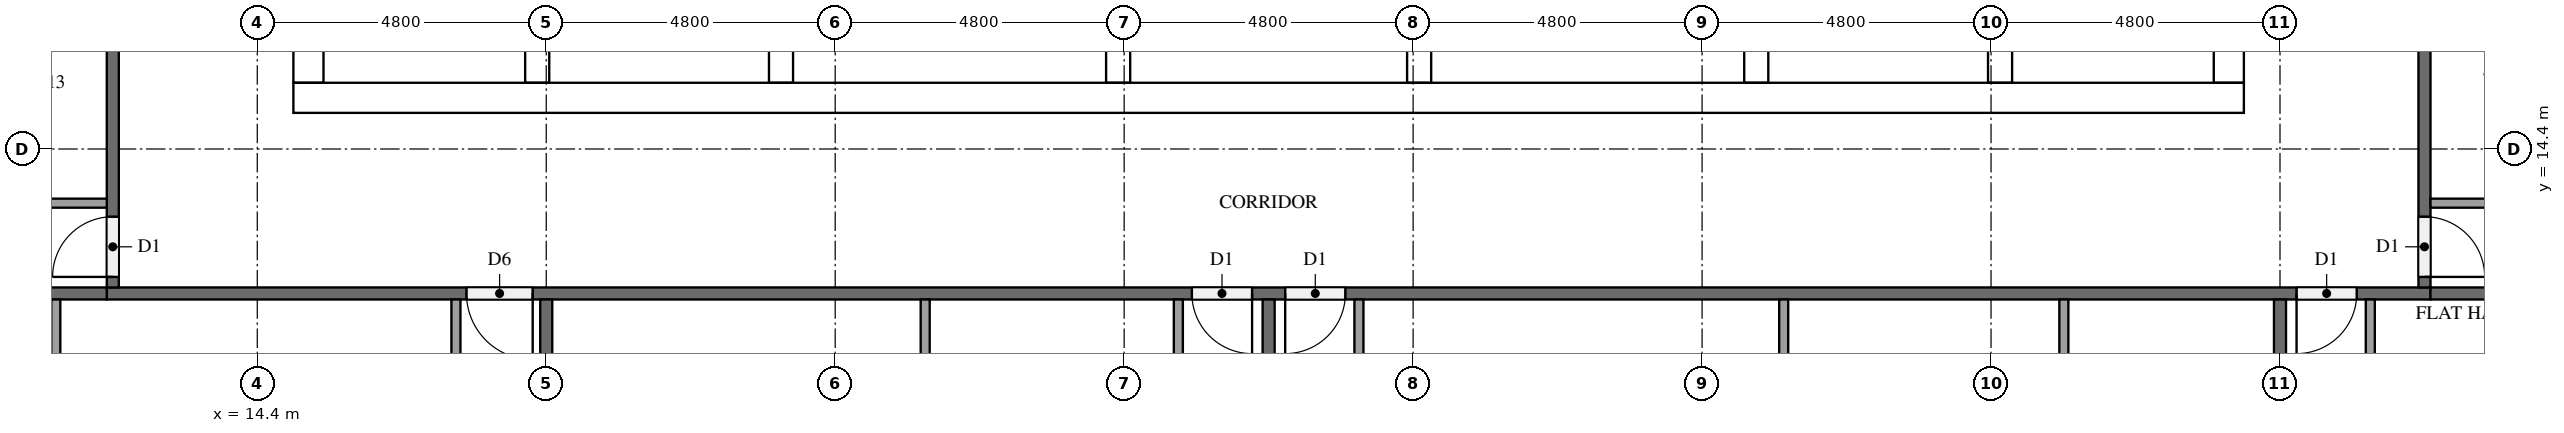
"""IFC4 building model, lengths in metres.
Left out: names, types, materials, properties, quantities, classifications, styles, units other than length and angle.
Written with IfcOpenShell. Run it as: python <this file> out.ifc"""

import sys

from ifc_helpers import new_model, si_unit, direction, frame, frame_2d, origin, place, context, subcontext, project, spatial, rectangle, extrude, element, fill, save


model = new_model("IFC4")
c1 = context("Model", 3, precision=1e-05, world=origin(), true_north=direction((0.0, 1.0)))
c2 = subcontext(c1, "Body", "Model", "MODEL_VIEW")
j1 = project(units=[si_unit("LENGTHUNIT", "METRE"), si_unit("PLANEANGLEUNIT", "RADIAN")], contexts=[c1])
p1 = place(None, origin())
s1 = spatial("IfcSite", under=j1, at=p1, CompositionType="ELEMENT")
p2 = place(p1, origin())
s2 = spatial("IfcBuilding", under=s1, at=p2, CompositionType="ELEMENT")
p3 = place(p2, frame((0.0, 0.0, 275.6)))
s3 = spatial("IfcBuildingStorey", under=s2, at=p3, CompositionType="ELEMENT", Elevation=275.6)
p4 = place(p3, frame((15.0, 15.25, 0.0), z_axis=(0.0, 0.0, 1.0), x_axis=(1.0, 0.0, 0.0)))
e1 = element("IfcWall", 1, at=p4, inside=s3, PredefinedType="SHEAR", context=c2, shape_type="SweptSolid", body=[
    extrude(rectangle(XDim=32.4, YDim=0.5, at=frame_2d((16.2, 0.0))), origin(), (0.0, 0.0, 1.0), 3.2),
])
p5 = place(p4, frame((15.3, 0.0, 0.0)))
e2 = element("IfcOpeningElement", 2, at=p5, cuts=e1, PredefinedType="OPENING", context=c2, shape_type="SweptSolid", body=[
    extrude(rectangle(XDim=1.8, YDim=2.1, at=frame_2d((0.9, 1.05))), frame((0.0, 0.26, 0.0), z_axis=(0.0, -1.0, 0.0), x_axis=(1.0, 0.0, 0.0)), (0.0, 0.0, 1.0), 0.52),
])
p6 = place(p3, frame((15.25, 15.5, 0.0), z_axis=(0.0, 0.0, 1.0), x_axis=(0.0, 1.0, 0.0)))
e3 = element("IfcWall", 3, at=p6, inside=s3, PredefinedType="SHEAR", context=c2, shape_type="SweptSolid", body=[
    extrude(rectangle(XDim=21.8, YDim=0.5, at=frame_2d((10.9, 0.0))), origin(), (0.0, 0.0, 1.0), 3.2),
])
p7 = place(p6, frame((5.26, 0.0, 0.0)))
e4 = element("IfcOpeningElement", 4, at=p7, cuts=e3, PredefinedType="OPENING", context=c2, shape_type="SweptSolid", body=[
    extrude(rectangle(XDim=1.2, YDim=2.1, at=frame_2d((0.6, 1.05))), frame((0.0, 0.26, 0.0), z_axis=(0.0, -1.0, 0.0), x_axis=(1.0, 0.0, 0.0)), (0.0, 0.0, 1.0), 0.52),
])
p8 = place(p3, frame((47.15, 15.5, 0.0), z_axis=(0.0, 0.0, 1.0), x_axis=(0.0, 1.0, 0.0)))
e5 = element("IfcWall", 5, at=p8, inside=s3, PredefinedType="SHEAR", context=c2, shape_type="SweptSolid", body=[
    extrude(rectangle(XDim=21.8, YDim=0.5, at=frame_2d((10.9, 0.0))), origin(), (0.0, 0.0, 1.0), 3.2),
])
p9 = place(p8, frame((10.6, 0.0, 0.0)))
e6 = element("IfcOpeningElement", 6, at=p9, cuts=e5, PredefinedType="OPENING", context=c2, shape_type="SweptSolid", body=[
    extrude(rectangle(XDim=1.2, YDim=2.1, at=frame_2d((0.6, 1.05))), frame((0.0, 0.26, 0.0), z_axis=(0.0, -1.0, 0.0), x_axis=(1.0, 0.0, 0.0)), (0.0, 0.0, 1.0), 0.52),
])
p10 = place(p3, frame((19.05, 15.5, 0.0), z_axis=(0.0, 0.0, 1.0), x_axis=(0.0, 1.0, 0.0)))
e7 = element("IfcWall", 7, at=p10, inside=s3, PredefinedType="SHEAR", context=c2, shape_type="SweptSolid", body=[
    extrude(rectangle(XDim=15.55, YDim=0.4, at=frame_2d((7.775, 0.0))), origin(), (0.0, 0.0, 1.0), 3.2),
])
p11 = place(p10, frame((9.95, 0.0, 0.0)))
e8 = element("IfcOpeningElement", 8, at=p11, cuts=e7, PredefinedType="OPENING", context=c2, shape_type="SweptSolid", body=[
    extrude(rectangle(XDim=1.1, YDim=2.1, at=frame_2d((0.55, 1.05))), frame((0.0, 0.21, 0.0), z_axis=(0.0, -1.0, 0.0), x_axis=(1.0, 0.0, 0.0)), (0.0, 0.0, 1.0), 0.42),
])
p12 = place(p10, frame((13.45, 0.0, 0.0)))
e9 = element("IfcOpeningElement", 9, at=p12, cuts=e7, PredefinedType="OPENING", context=c2, shape_type="SweptSolid", body=[
    extrude(rectangle(XDim=1.1, YDim=2.1, at=frame_2d((0.55, 1.05))), frame((0.0, 0.21, 0.0), z_axis=(0.0, -1.0, 0.0), x_axis=(1.0, 0.0, 0.0)), (0.0, 0.0, 1.0), 0.42),
])
p13 = place(p10, frame((0.7, 0.0, 0.0)))
e10 = element("IfcOpeningElement", 10, at=p13, cuts=e7, PredefinedType="OPENING", context=c2, shape_type="SweptSolid", body=[
    extrude(rectangle(XDim=1.2, YDim=2.1, at=frame_2d((0.6, 1.05))), frame((0.0, 0.21, 0.0), z_axis=(0.0, -1.0, 0.0), x_axis=(1.0, 0.0, 0.0)), (0.0, 0.0, 1.0), 0.42),
])
p14 = place(p3, frame((23.1, 15.5, 0.0), z_axis=(0.0, 0.0, 1.0), x_axis=(0.0, 1.0, 0.0)))
e11 = element("IfcWall", 11, at=p14, inside=s3, PredefinedType="SHEAR", context=c2, shape_type="SweptSolid", body=[
    extrude(rectangle(XDim=21.8, YDim=0.4, at=frame_2d((10.9, 0.0))), origin(), (0.0, 0.0, 1.0), 3.2),
])
p15 = place(p3, frame((39.3, 15.5, 0.0), z_axis=(0.0, 0.0, 1.0), x_axis=(0.0, 1.0, 0.0)))
e12 = element("IfcWall", 12, at=p15, inside=s3, PredefinedType="SHEAR", context=c2, shape_type="SweptSolid", body=[
    extrude(rectangle(XDim=8.75, YDim=0.4, at=frame_2d((4.375, 0.0))), origin(), (0.0, 0.0, 1.0), 3.2),
])
p16 = place(p3, frame((43.35, 15.5, 0.0), z_axis=(0.0, 0.0, 1.0), x_axis=(0.0, 1.0, 0.0)))
e13 = element("IfcWall", 13, at=p16, inside=s3, PredefinedType="SHEAR", context=c2, shape_type="SweptSolid", body=[
    extrude(rectangle(XDim=8.75, YDim=0.4, at=frame_2d((4.375, 0.0))), origin(), (0.0, 0.0, 1.0), 3.2),
])
p17 = place(p16, frame((0.7, 0.0, 0.0)))
e14 = element("IfcOpeningElement", 14, at=p17, cuts=e13, PredefinedType="OPENING", context=c2, shape_type="SweptSolid", body=[
    extrude(rectangle(XDim=1.2, YDim=2.1, at=frame_2d((0.6, 1.05))), frame((0.0, 0.21, 0.0), z_axis=(0.0, -1.0, 0.0), x_axis=(1.0, 0.0, 0.0)), (0.0, 0.0, 1.0), 0.42),
])
for number, where, z_axis, x_axis in (
    (15, (28.7, 15.5, 0.0), (0.0, 0.0, 1.0), (0.0, 1.0, 0.0)),
    (16, (33.7, 15.5, 0.0), (0.0, 0.0, 1.0), (0.0, 1.0, 0.0)),
):
    element("IfcWall", number, at=place(p3, frame(where, z_axis=z_axis, x_axis=x_axis)), inside=s3, PredefinedType="SHEAR", context=c2, shape_type="SweptSolid", body=[
        extrude(rectangle(XDim=3.05, YDim=0.4, at=frame_2d((1.525, 0.0))), origin(), (0.0, 0.0, 1.0), 3.2),
    ])
p18 = place(p3, frame((50.5, 12.0, 0.0), z_axis=(0.0, 0.0, 1.0), x_axis=(-1.0, 0.0, 0.0)))
e17 = element("IfcWall", 17, at=p18, inside=s3, PredefinedType="PARTITIONING", context=c2, shape_type="SweptSolid", body=[
    extrude(rectangle(XDim=38.6, YDim=0.2, at=frame_2d((19.3, 0.0))), origin(), (0.0, 0.0, 1.0), 3.2),
])
p19 = place(p18, frame((31.525, 0.0, 0.0)))
e18 = element("IfcOpeningElement", 18, at=p19, cuts=e17, PredefinedType="OPENING", context=c2, shape_type="SweptSolid", body=[
    extrude(rectangle(XDim=1.1, YDim=2.1, at=frame_2d((0.55, 1.05))), frame((0.0, 0.11, 0.0), z_axis=(0.0, -1.0, 0.0), x_axis=(1.0, 0.0, 0.0)), (0.0, 0.0, 1.0), 0.22),
])
p20 = place(p18, frame((19.575, 0.0, 0.0)))
e19 = element("IfcOpeningElement", 19, at=p20, cuts=e17, PredefinedType="OPENING", context=c2, shape_type="SweptSolid", body=[
    extrude(rectangle(XDim=1.0, YDim=2.1, at=frame_2d((0.5, 1.05))), frame((0.0, 0.11, 0.0), z_axis=(0.0, -1.0, 0.0), x_axis=(1.0, 0.0, 0.0)), (0.0, 0.0, 1.0), 0.22),
])
p21 = place(p18, frame((18.025, 0.0, 0.0)))
e20 = element("IfcOpeningElement", 20, at=p21, cuts=e17, PredefinedType="OPENING", context=c2, shape_type="SweptSolid", body=[
    extrude(rectangle(XDim=1.0, YDim=2.1, at=frame_2d((0.5, 1.05))), frame((0.0, 0.11, 0.0), z_axis=(0.0, -1.0, 0.0), x_axis=(1.0, 0.0, 0.0)), (0.0, 0.0, 1.0), 0.22),
])
p22 = place(p18, frame((1.225, 0.0, 0.0)))
e21 = element("IfcOpeningElement", 21, at=p22, cuts=e17, PredefinedType="OPENING", context=c2, shape_type="SweptSolid", body=[
    extrude(rectangle(XDim=1.0, YDim=2.1, at=frame_2d((0.5, 1.05))), frame((0.0, 0.11, 0.0), z_axis=(0.0, -1.0, 0.0), x_axis=(1.0, 0.0, 0.0)), (0.0, 0.0, 1.0), 0.22),
])
p23 = place(p3, frame((50.4, 40.7, 0.0), z_axis=(0.0, 0.0, 1.0), x_axis=(0.0, -1.0, 0.0)))
e22 = element("IfcWall", 22, at=p23, inside=s3, PredefinedType="PARTITIONING", context=c2, shape_type="SweptSolid", body=[
    extrude(rectangle(XDim=28.6, YDim=0.2, at=frame_2d((14.3, 0.0))), origin(), (0.0, 0.0, 1.0), 3.2),
])
p24 = place(p23, frame((27.425, 0.0, 0.0)))
e23 = element("IfcOpeningElement", 23, at=p24, cuts=e22, PredefinedType="OPENING", context=c2, shape_type="SweptSolid", body=[
    extrude(rectangle(XDim=1.0, YDim=2.1, at=frame_2d((0.5, 1.05))), frame((0.0, 0.11, 0.0), z_axis=(0.0, -1.0, 0.0), x_axis=(1.0, 0.0, 0.0)), (0.0, 0.0, 1.0), 0.22),
])
p25 = place(p23, frame((0.175, 0.0, 0.0)))
e24 = element("IfcOpeningElement", 24, at=p25, cuts=e22, PredefinedType="OPENING", context=c2, shape_type="SweptSolid", body=[
    extrude(rectangle(XDim=1.0, YDim=2.1, at=frame_2d((0.5, 1.05))), frame((0.0, 0.11, 0.0), z_axis=(0.0, -1.0, 0.0), x_axis=(1.0, 0.0, 0.0)), (0.0, 0.0, 1.0), 0.22),
])
p26 = place(p3, frame((12.0, 12.1, 0.0), z_axis=(0.0, 0.0, 1.0), x_axis=(0.0, 1.0, 0.0)))
e25 = element("IfcWall", 25, at=p26, inside=s3, PredefinedType="PARTITIONING", context=c2, shape_type="SweptSolid", body=[
    extrude(rectangle(XDim=28.6, YDim=0.2, at=frame_2d((14.3, 0.0))), origin(), (0.0, 0.0, 1.0), 3.2),
])
p27 = place(p26, frame((24.175, 0.0, 0.0)))
e26 = element("IfcOpeningElement", 26, at=p27, cuts=e25, PredefinedType="OPENING", context=c2, shape_type="SweptSolid", body=[
    extrude(rectangle(XDim=1.0, YDim=2.1, at=frame_2d((0.5, 1.05))), frame((0.0, 0.11, 0.0), z_axis=(0.0, -1.0, 0.0), x_axis=(1.0, 0.0, 0.0)), (0.0, 0.0, 1.0), 0.22),
])
p28 = place(p26, frame((14.575, 0.0, 0.0)))
e27 = element("IfcOpeningElement", 27, at=p28, cuts=e25, PredefinedType="OPENING", context=c2, shape_type="SweptSolid", body=[
    extrude(rectangle(XDim=1.0, YDim=2.1, at=frame_2d((0.5, 1.05))), frame((0.0, 0.11, 0.0), z_axis=(0.0, -1.0, 0.0), x_axis=(1.0, 0.0, 0.0)), (0.0, 0.0, 1.0), 0.22),
])
p29 = place(p26, frame((0.175, 0.0, 0.0)))
e28 = element("IfcOpeningElement", 28, at=p29, cuts=e25, PredefinedType="OPENING", context=c2, shape_type="SweptSolid", body=[
    extrude(rectangle(XDim=1.0, YDim=2.1, at=frame_2d((0.5, 1.05))), frame((0.0, 0.11, 0.0), z_axis=(0.0, -1.0, 0.0), x_axis=(1.0, 0.0, 0.0)), (0.0, 0.0, 1.0), 0.22),
])
for number, where, z_axis, x_axis in (
    (29, (19.2, 11.9, 0.0), (0.0, 0.0, 1.0), (0.0, -1.0, 0.0)),
    (30, (0.1, 12.0, 0.0), (0.0, 0.0, 1.0), (1.0, 0.0, 0.0)),
    (31, (31.2, 11.9, 0.0), (0.0, 0.0, 1.0), (0.0, -1.0, 0.0)),
    (32, (48.0, 11.9, 0.0), (0.0, 0.0, 1.0), (0.0, -1.0, 0.0)),
):
    element("IfcWall", number, at=place(p3, frame(where, z_axis=z_axis, x_axis=x_axis)), inside=s3, PredefinedType="PARTITIONING", context=c2, shape_type="SweptSolid", body=[
        extrude(rectangle(XDim=11.8, YDim=0.2, at=frame_2d((5.9, 0.0))), origin(), (0.0, 0.0, 1.0), 3.2),
    ])
p30 = place(p3, frame((50.5, 12.0, 0.0), z_axis=(0.0, 0.0, 1.0), x_axis=(1.0, 0.0, 0.0)))
e33 = element("IfcWall", 33, at=p30, inside=s3, PredefinedType="PARTITIONING", context=c2, shape_type="SweptSolid", body=[
    extrude(rectangle(XDim=7.0, YDim=0.2, at=frame_2d((3.5, 0.0))), origin(), (0.0, 0.0, 1.0), 3.2),
])
p31 = place(p3, frame((11.053, 11.9, 0.0), z_axis=(0.0, 0.0, 1.0), x_axis=(0.0, -1.0, 0.0)))
e34 = element("IfcWall", 34, at=p31, inside=s3, PredefinedType="PARTITIONING", context=c2, shape_type="SweptSolid", body=[
    extrude(rectangle(XDim=2.975, YDim=0.15, at=frame_2d((1.487, 0.0))), origin(), (0.0, 0.0, 1.0), 3.2),
])
p32 = place(p3, frame((17.7, 11.9, 0.0), z_axis=(0.0, 0.0, 1.0), x_axis=(0.0, -1.0, 0.0)))
e35 = element("IfcWall", 35, at=p32, inside=s3, PredefinedType="PARTITIONING", context=c2, shape_type="SweptSolid", body=[
    extrude(rectangle(XDim=3.125, YDim=0.15, at=frame_2d((1.562, 0.0))), origin(), (0.0, 0.0, 1.0), 3.2),
])
p33 = place(p3, frame((25.495, 11.9, 0.0), z_axis=(0.0, 0.0, 1.0), x_axis=(0.0, -1.0, 0.0)))
e36 = element("IfcWall", 36, at=p33, inside=s3, PredefinedType="PARTITIONING", context=c2, shape_type="SweptSolid", body=[
    extrude(rectangle(XDim=2.975, YDim=0.15, at=frame_2d((1.487, 0.0))), origin(), (0.0, 0.0, 1.0), 3.2),
])
p34 = place(p3, frame((29.7, 11.9, 0.0), z_axis=(0.0, 0.0, 1.0), x_axis=(0.0, -1.0, 0.0)))
e37 = element("IfcWall", 37, at=p34, inside=s3, PredefinedType="PARTITIONING", context=c2, shape_type="SweptSolid", body=[
    extrude(rectangle(XDim=3.125, YDim=0.15, at=frame_2d((1.562, 0.0))), origin(), (0.0, 0.0, 1.0), 3.2),
])
for number, where, z_axis, x_axis in (
    (38, (39.756, 11.9, 0.0), (0.0, 0.0, 1.0), (0.0, -1.0, 0.0)),
    (39, (44.41, 11.9, 0.0), (0.0, 0.0, 1.0), (0.0, -1.0, 0.0)),
):
    element("IfcWall", number, at=place(p3, frame(where, z_axis=z_axis, x_axis=x_axis)), inside=s3, PredefinedType="PARTITIONING", context=c2, shape_type="SweptSolid", body=[
        extrude(rectangle(XDim=3.725, YDim=0.15, at=frame_2d((1.862, 0.0))), origin(), (0.0, 0.0, 1.0), 3.2),
    ])
p35 = place(p3, frame((32.7, 11.9, 0.0), z_axis=(0.0, 0.0, 1.0), x_axis=(0.0, -1.0, 0.0)))
e40 = element("IfcWall", 40, at=p35, inside=s3, PredefinedType="PARTITIONING", context=c2, shape_type="SweptSolid", body=[
    extrude(rectangle(XDim=3.875, YDim=0.15, at=frame_2d((1.938, 0.0))), origin(), (0.0, 0.0, 1.0), 3.2),
])
p36 = place(p3, frame((49.5, 11.9, 0.0), z_axis=(0.0, 0.0, 1.0), x_axis=(0.0, -1.0, 0.0)))
e41 = element("IfcWall", 41, at=p36, inside=s3, PredefinedType="PARTITIONING", context=c2, shape_type="SweptSolid", body=[
    extrude(rectangle(XDim=3.125, YDim=0.15, at=frame_2d((1.562, 0.0))), origin(), (0.0, 0.0, 1.0), 3.2),
])
p37 = place(p3, frame((50.5, 13.5, 0.0), z_axis=(0.0, 0.0, 1.0), x_axis=(1.0, 0.0, 0.0)))
e42 = element("IfcWall", 42, at=p37, inside=s3, PredefinedType="PARTITIONING", context=c2, shape_type="SweptSolid", body=[
    extrude(rectangle(XDim=2.525, YDim=0.15, at=frame_2d((1.262, 0.0))), origin(), (0.0, 0.0, 1.0), 3.2),
])
p38 = place(p3, frame((11.9, 13.5, 0.0), z_axis=(0.0, 0.0, 1.0), x_axis=(-1.0, 0.0, 0.0)))
e43 = element("IfcWall", 43, at=p38, inside=s3, PredefinedType="PARTITIONING", context=c2, shape_type="SweptSolid", body=[
    extrude(rectangle(XDim=4.025, YDim=0.15, at=frame_2d((2.012, 0.0))), origin(), (0.0, 0.0, 1.0), 3.2),
])
p39 = place(p5, frame((1.8, 0.0, 0.0), z_axis=(0.0, 0.0, 1.0), x_axis=(-1.0, 0.0, 0.0)))
e44 = element("IfcDoor", 44, at=p39, inside=s3, OperationType="DOUBLE_DOOR_SINGLE_SWING", PredefinedType="DOOR", context=c2, shape_type="SweptSolid", body=[
    extrude(rectangle(XDim=1.8, YDim=2.1, at=frame_2d((0.9, 1.05))), frame((0.0, 0.025, 0.0), z_axis=(0.0, -1.0, 0.0), x_axis=(1.0, 0.0, 0.0)), (0.0, 0.0, 1.0), 0.05),
])
fill(e2, e44)
p40 = place(p19, origin())
e45 = element("IfcDoor", 45, at=p40, inside=s3, OperationType="SINGLE_SWING_LEFT", PredefinedType="DOOR", context=c2, shape_type="SweptSolid", body=[
    extrude(rectangle(XDim=1.1, YDim=2.1, at=frame_2d((0.55, 1.05))), frame((0.0, 0.025, 0.0), z_axis=(0.0, -1.0, 0.0), x_axis=(1.0, 0.0, 0.0)), (0.0, 0.0, 1.0), 0.05),
])
fill(e18, e45)
p41 = place(p20, origin())
e46 = element("IfcDoor", 46, at=p41, inside=s3, OperationType="SINGLE_SWING_LEFT", PredefinedType="DOOR", context=c2, shape_type="SweptSolid", body=[
    extrude(rectangle(XDim=1.0, YDim=2.1, at=frame_2d((0.5, 1.05))), frame((0.0, 0.025, 0.0), z_axis=(0.0, -1.0, 0.0), x_axis=(1.0, 0.0, 0.0)), (0.0, 0.0, 1.0), 0.05),
])
fill(e19, e46)
p42 = place(p21, origin())
e47 = element("IfcDoor", 47, at=p42, inside=s3, OperationType="SINGLE_SWING_RIGHT", PredefinedType="DOOR", context=c2, shape_type="SweptSolid", body=[
    extrude(rectangle(XDim=1.0, YDim=2.1, at=frame_2d((0.5, 1.05))), frame((0.0, 0.025, 0.0), z_axis=(0.0, -1.0, 0.0), x_axis=(1.0, 0.0, 0.0)), (0.0, 0.0, 1.0), 0.05),
])
fill(e20, e47)
p43 = place(p22, origin())
e48 = element("IfcDoor", 48, at=p43, inside=s3, OperationType="SINGLE_SWING_RIGHT", PredefinedType="DOOR", context=c2, shape_type="SweptSolid", body=[
    extrude(rectangle(XDim=1.0, YDim=2.1, at=frame_2d((0.5, 1.05))), frame((0.0, 0.025, 0.0), z_axis=(0.0, -1.0, 0.0), x_axis=(1.0, 0.0, 0.0)), (0.0, 0.0, 1.0), 0.05),
])
fill(e21, e48)
p44 = place(p24, origin())
e49 = element("IfcDoor", 49, at=p44, inside=s3, OperationType="SINGLE_SWING_RIGHT", PredefinedType="DOOR", context=c2, shape_type="SweptSolid", body=[
    extrude(rectangle(XDim=1.0, YDim=2.1, at=frame_2d((0.5, 1.05))), frame((0.0, 0.025, 0.0), z_axis=(0.0, -1.0, 0.0), x_axis=(1.0, 0.0, 0.0)), (0.0, 0.0, 1.0), 0.05),
])
fill(e23, e49)
p45 = place(p29, origin())
e50 = element("IfcDoor", 50, at=p45, inside=s3, OperationType="SINGLE_SWING_LEFT", PredefinedType="DOOR", context=c2, shape_type="SweptSolid", body=[
    extrude(rectangle(XDim=1.0, YDim=2.1, at=frame_2d((0.5, 1.05))), frame((0.0, 0.025, 0.0), z_axis=(0.0, -1.0, 0.0), x_axis=(1.0, 0.0, 0.0)), (0.0, 0.0, 1.0), 0.05),
])
fill(e28, e50)
save(model, sys.argv[1])
